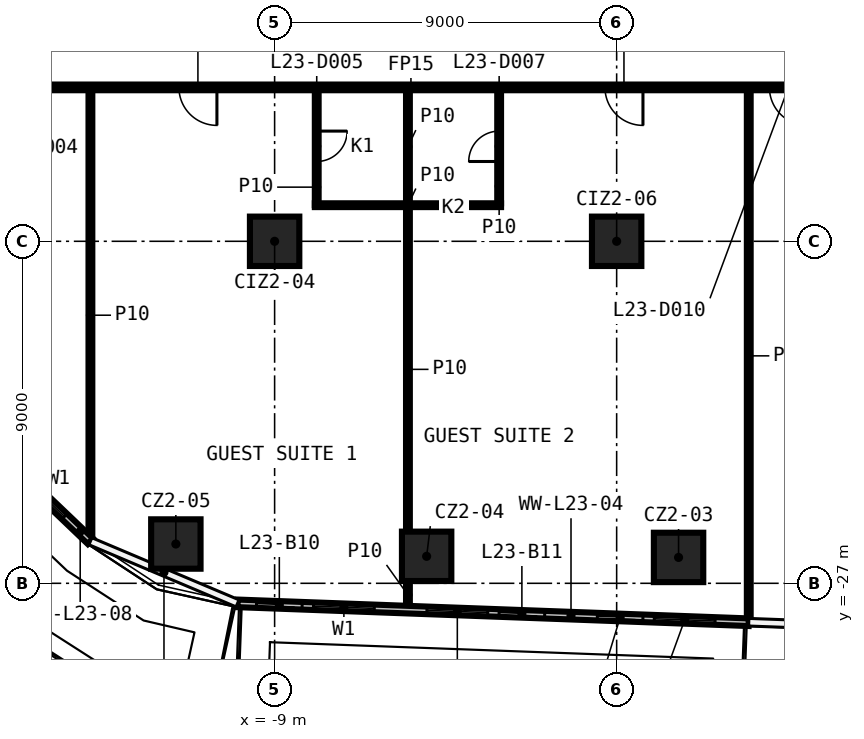
"""IFC4 building model, lengths in metres.
Left out: names, types, materials, properties, quantities, classifications, styles, units other than length and angle.
Written with IfcOpenShell. Run it as: python <this file> out.ifc"""

import sys

from ifc_helpers import new_model, si_unit, direction, frame, frame_2d, origin, origin_2d, place, context, subcontext, project, spatial, rectangle, extrude, element, fill, save


model = new_model("IFC4")
c1 = context("Model", 3, precision=1e-05, world=origin(), true_north=direction((0.0, 1.0)))
c2 = subcontext(c1, "Body", "Model", "MODEL_VIEW")
j1 = project(units=[si_unit("LENGTHUNIT", "METRE"), si_unit("PLANEANGLEUNIT", "RADIAN")], contexts=[c1])
p1 = place(None, origin())
s1 = spatial("IfcSite", under=j1, at=p1, CompositionType="ELEMENT")
p2 = place(p1, origin())
s2 = spatial("IfcBuilding", under=s1, at=p2, CompositionType="ELEMENT")
p3 = place(p2, frame((0.0, 0.0, 110.0)))
s3 = spatial("IfcBuildingStorey", under=s2, at=p3, CompositionType="ELEMENT", Elevation=110.0)
for number, where, z_axis, x_axis in (
    (1, (1.629, -26.319, 0.0), (0.0, 0.0, 1.0), (1.0, 0.0, 0.0)),
    (2, (-5.0, -26.29, 0.0), (0.0, 0.0, 1.0), (1.0, 0.0, 0.0)),
    (3, (-11.599, -25.966, 0.0), (0.0, 0.0, 1.0), (1.0, 0.0, 0.0)),
    (4, (-9.0, -18.0, 0.0), (0.0, 0.0, 1.0), (1.0, 0.0, 0.0)),
    (5, (0.0, -18.0, 0.0), (0.0, 0.0, 1.0), (1.0, 0.0, 0.0)),
):
    element("IfcColumn", number, at=place(p3, frame(where, z_axis=z_axis, x_axis=x_axis)), inside=s3, PredefinedType="COLUMN", context=c2, shape_type="SweptSolid", body=[
        extrude(rectangle(XDim=1.3, YDim=1.3, at=origin_2d()), origin(), (0.0, 0.0, 1.0), 3.3),
    ])
p4 = place(p3, frame((-7.942, -17.05, 0.0), z_axis=(0.0, 0.0, 1.0), x_axis=(1.0, 0.0, 0.0)))
e6 = element("IfcWall", 6, at=p4, inside=s3, PredefinedType="PARTITIONING", context=c2, shape_type="SweptSolid", body=[
    extrude(rectangle(XDim=4.9, YDim=0.1, at=frame_2d((2.45, 0.0))), origin(), (0.0, 0.0, 1.0), 3.3),
])
p5 = place(p3, frame((17.025, -13.95, 0.0), z_axis=(0.0, 0.0, 1.0), x_axis=(-1.0, 0.0, 0.0)))
e7 = element("IfcWall", 7, at=p5, inside=s3, PredefinedType="PARTITIONING", context=c2, shape_type="SweptSolid", body=[
    extrude(rectangle(XDim=34.05, YDim=0.15, at=frame_2d((17.025, 0.0))), origin(), (0.0, 0.0, 1.0), 3.3),
])
p6 = place(p5, frame((31.974, 0.0, 0.0)))
e8 = element("IfcOpeningElement", 8, at=p6, cuts=e7, PredefinedType="OPENING", context=c2, shape_type="SweptSolid", body=[
    extrude(rectangle(XDim=0.9, YDim=2.1, at=frame_2d((0.45, 1.05))), frame((0.0, 0.085, 0.0), z_axis=(0.0, -1.0, 0.0), x_axis=(1.0, 0.0, 0.0)), (0.0, 0.0, 1.0), 0.17),
])
p7 = place(p5, frame((27.543, 0.0, 0.0)))
e9 = element("IfcOpeningElement", 9, at=p7, cuts=e7, PredefinedType="OPENING", context=c2, shape_type="SweptSolid", body=[
    extrude(rectangle(XDim=1.0, YDim=2.1, at=frame_2d((0.5, 1.05))), frame((0.0, 0.085, 0.0), z_axis=(0.0, -1.0, 0.0), x_axis=(1.0, 0.0, 0.0)), (0.0, 0.0, 1.0), 0.17),
])
p8 = place(p5, frame((16.333, 0.0, 0.0)))
e10 = element("IfcOpeningElement", 10, at=p8, cuts=e7, PredefinedType="OPENING", context=c2, shape_type="SweptSolid", body=[
    extrude(rectangle(XDim=1.0, YDim=2.1, at=frame_2d((0.5, 1.05))), frame((0.0, 0.085, 0.0), z_axis=(0.0, -1.0, 0.0), x_axis=(1.0, 0.0, 0.0)), (0.0, 0.0, 1.0), 0.17),
])
p9 = place(p5, frame((12.006, 0.0, 0.0)))
e11 = element("IfcOpeningElement", 11, at=p9, cuts=e7, PredefinedType="OPENING", context=c2, shape_type="SweptSolid", body=[
    extrude(rectangle(XDim=1.0, YDim=2.1, at=frame_2d((0.5, 1.05))), frame((0.0, 0.085, 0.0), z_axis=(0.0, -1.0, 0.0), x_axis=(1.0, 0.0, 0.0)), (0.0, 0.0, 1.0), 0.17),
])
p10 = place(p5, frame((5.124, 0.0, 0.0)))
e12 = element("IfcOpeningElement", 12, at=p10, cuts=e7, PredefinedType="OPENING", context=c2, shape_type="SweptSolid", body=[
    extrude(rectangle(XDim=1.0, YDim=2.1, at=frame_2d((0.5, 1.05))), frame((0.0, 0.085, 0.0), z_axis=(0.0, -1.0, 0.0), x_axis=(1.0, 0.0, 0.0)), (0.0, 0.0, 1.0), 0.17),
])
p11 = place(p5, frame((3.144, 0.0, 0.0)))
e13 = element("IfcOpeningElement", 13, at=p11, cuts=e7, PredefinedType="OPENING", context=c2, shape_type="SweptSolid", body=[
    extrude(rectangle(XDim=1.0, YDim=2.1, at=frame_2d((0.5, 1.05))), frame((0.0, 0.085, 0.0), z_axis=(0.0, -1.0, 0.0), x_axis=(1.0, 0.0, 0.0)), (0.0, 0.0, 1.0), 0.17),
])
p12 = place(p3, frame((3.476, -28.004, 0.0), z_axis=(0.0, 0.0, 1.0), x_axis=(0.0, 1.0, 0.0)))
e14 = element("IfcWall", 14, at=p12, inside=s3, PredefinedType="PARTITIONING", context=c2, shape_type="SweptSolid", body=[
    extrude(rectangle(XDim=13.979, YDim=0.1, at=frame_2d((6.99, 0.0))), origin(), (0.0, 0.0, 1.0), 3.3),
])
p13 = place(p3, frame((-3.092, -17.0, 0.0), z_axis=(0.0, 0.0, 1.0), x_axis=(0.0, 1.0, 0.0)))
e15 = element("IfcWall", 15, at=p13, inside=s3, PredefinedType="PARTITIONING", context=c2, shape_type="SweptSolid", body=[
    extrude(rectangle(XDim=2.975, YDim=0.1, at=frame_2d((1.488, 0.0))), origin(), (0.0, 0.0, 1.0), 3.3),
])
p14 = place(p13, frame((1.1, 0.0, 0.0)))
e16 = element("IfcOpeningElement", 16, at=p14, cuts=e15, PredefinedType="OPENING", context=c2, shape_type="SweptSolid", body=[
    extrude(rectangle(XDim=0.8, YDim=2.1, at=frame_2d((0.4, 1.05))), frame((0.0, 0.06, 0.0), z_axis=(0.0, -1.0, 0.0), x_axis=(1.0, 0.0, 0.0)), (0.0, 0.0, 1.0), 0.12),
])
p15 = place(p3, frame((-5.492, -27.673, 0.0), z_axis=(0.0, 0.0, 1.0), x_axis=(0.0, 1.0, 0.0)))
e17 = element("IfcWall", 17, at=p15, inside=s3, PredefinedType="PARTITIONING", context=c2, shape_type="SweptSolid", body=[
    extrude(rectangle(XDim=0.733, YDim=0.1, at=frame_2d((0.367, 0.0))), origin(), (0.0, 0.0, 1.0), 3.3),
])
p16 = place(p3, frame((-5.492, -25.64, 0.0), z_axis=(0.0, 0.0, 1.0), x_axis=(0.0, 1.0, 0.0)))
e18 = element("IfcWall", 18, at=p16, inside=s3, PredefinedType="PARTITIONING", context=c2, shape_type="SweptSolid", body=[
    extrude(rectangle(XDim=8.54, YDim=0.1, at=frame_2d((4.27, 0.0))), origin(), (0.0, 0.0, 1.0), 3.3),
])
p17 = place(p3, frame((-5.492, -17.0, 0.0), z_axis=(0.0, 0.0, 1.0), x_axis=(0.0, 1.0, 0.0)))
e19 = element("IfcWall", 19, at=p17, inside=s3, PredefinedType="PARTITIONING", context=c2, shape_type="SweptSolid", body=[
    extrude(rectangle(XDim=2.975, YDim=0.1, at=frame_2d((1.488, 0.0))), origin(), (0.0, 0.0, 1.0), 3.3),
])
p18 = place(p3, frame((-7.892, -14.025, 0.0), z_axis=(0.0, 0.0, 1.0), x_axis=(0.0, -1.0, 0.0)))
e20 = element("IfcWall", 20, at=p18, inside=s3, PredefinedType="PARTITIONING", context=c2, shape_type="SweptSolid", body=[
    extrude(rectangle(XDim=3.025, YDim=0.1, at=frame_2d((1.513, 0.0))), origin(), (0.0, 0.0, 1.0), 3.3),
])
p19 = place(p18, frame((1.075, 0.0, 0.0)))
e21 = element("IfcOpeningElement", 21, at=p19, cuts=e20, PredefinedType="OPENING", context=c2, shape_type="SweptSolid", body=[
    extrude(rectangle(XDim=0.8, YDim=2.1, at=frame_2d((0.4, 1.05))), frame((0.0, 0.06, 0.0), z_axis=(0.0, -1.0, 0.0), x_axis=(1.0, 0.0, 0.0)), (0.0, 0.0, 1.0), 0.12),
])
p20 = place(p3, frame((-13.847, -25.865, 0.0), z_axis=(0.0, 0.0, 1.0), x_axis=(0.0, 1.0, 0.0)))
e22 = element("IfcWall", 22, at=p20, inside=s3, PredefinedType="PARTITIONING", context=c2, shape_type="SweptSolid", body=[
    extrude(rectangle(XDim=11.84, YDim=0.1, at=frame_2d((5.92, 0.0))), origin(), (0.0, 0.0, 1.0), 3.3),
])
p21 = place(p3, frame((-17.133, -22.756, 0.0), z_axis=(0.0, 0.0, 1.0), x_axis=(0.723361644964, -0.69046935529, 0.0)))
e23 = element("IfcWall", 23, at=p21, inside=s3, PredefinedType="SOLIDWALL", context=c2, shape_type="SweptSolid", body=[
    extrude(rectangle(XDim=4.542, YDim=0.2, at=frame_2d((2.271, 0.0))), origin(), (0.0, 0.0, 1.0), 3.3),
])
p22 = place(p21, frame((2.0, 0.0, 0.6)))
e24 = element("IfcOpeningElement", 24, at=p22, cuts=e23, PredefinedType="OPENING", context=c2, shape_type="SweptSolid", body=[
    extrude(rectangle(XDim=1.6, YDim=2.4, at=frame_2d((0.8, 1.2))), frame((0.0, 0.11, 0.0), z_axis=(0.0, -1.0, 0.0), x_axis=(1.0, 0.0, 0.0)), (0.0, 0.0, 1.0), 0.22),
])
p23 = place(p21, frame((0.5, 0.0, 0.0)))
e25 = element("IfcOpeningElement", 25, at=p23, cuts=e23, PredefinedType="OPENING", context=c2, shape_type="SweptSolid", body=[
    extrude(rectangle(XDim=1.2, YDim=2.4, at=frame_2d((0.6, 1.2))), frame((0.0, 0.11, 0.0), z_axis=(0.0, -1.0, 0.0), x_axis=(1.0, 0.0, 0.0)), (0.0, 0.0, 1.0), 0.22),
])
p24 = place(p3, frame((-9.975, -27.528, 0.0), z_axis=(0.0, 0.0, 1.0), x_axis=(0.999319917794, -0.036874135924, 0.0)))
e26 = element("IfcWall", 26, at=p24, inside=s3, PredefinedType="SOLIDWALL", context=c2, shape_type="SweptSolid", body=[
    extrude(rectangle(XDim=13.46, YDim=0.2, at=frame_2d((6.73, 0.0))), origin(), (0.0, 0.0, 1.0), 3.3),
])
p25 = place(p24, frame((2.0, 0.0, 0.6)))
e27 = element("IfcOpeningElement", 27, at=p25, cuts=e26, PredefinedType="OPENING", context=c2, shape_type="SweptSolid", body=[
    extrude(rectangle(XDim=1.6, YDim=2.4, at=frame_2d((0.8, 1.2))), frame((0.0, 0.11, 0.0), z_axis=(0.0, -1.0, 0.0), x_axis=(1.0, 0.0, 0.0)), (0.0, 0.0, 1.0), 0.22),
])
p26 = place(p24, frame((0.5, 0.0, 0.0)))
e28 = element("IfcOpeningElement", 28, at=p26, cuts=e26, PredefinedType="OPENING", context=c2, shape_type="SweptSolid", body=[
    extrude(rectangle(XDim=1.2, YDim=2.4, at=frame_2d((0.6, 1.2))), frame((0.0, 0.11, 0.0), z_axis=(0.0, -1.0, 0.0), x_axis=(1.0, 0.0, 0.0)), (0.0, 0.0, 1.0), 0.22),
])
p27 = place(p24, frame((4.987, 0.0, 0.6)))
e29 = element("IfcOpeningElement", 29, at=p27, cuts=e26, PredefinedType="OPENING", context=c2, shape_type="SweptSolid", body=[
    extrude(rectangle(XDim=1.6, YDim=2.4, at=frame_2d((0.8, 1.2))), frame((0.0, 0.11, 0.0), z_axis=(0.0, -1.0, 0.0), x_axis=(1.0, 0.0, 0.0)), (0.0, 0.0, 1.0), 0.22),
])
p28 = place(p24, frame((6.887, 0.0, 0.0)))
e30 = element("IfcOpeningElement", 30, at=p28, cuts=e26, PredefinedType="OPENING", context=c2, shape_type="SweptSolid", body=[
    extrude(rectangle(XDim=1.2, YDim=2.4, at=frame_2d((0.6, 1.2))), frame((0.0, 0.11, 0.0), z_axis=(0.0, -1.0, 0.0), x_axis=(1.0, 0.0, 0.0)), (0.0, 0.0, 1.0), 0.22),
])
p29 = place(p24, frame((10.974, 0.0, 0.6)))
e31 = element("IfcOpeningElement", 31, at=p29, cuts=e26, PredefinedType="OPENING", context=c2, shape_type="SweptSolid", body=[
    extrude(rectangle(XDim=1.6, YDim=2.4, at=frame_2d((0.8, 1.2))), frame((0.0, 0.11, 0.0), z_axis=(0.0, -1.0, 0.0), x_axis=(1.0, 0.0, 0.0)), (0.0, 0.0, 1.0), 0.22),
])
p30 = place(p24, frame((9.474, 0.0, 0.0)))
e32 = element("IfcOpeningElement", 32, at=p30, cuts=e26, PredefinedType="OPENING", context=c2, shape_type="SweptSolid", body=[
    extrude(rectangle(XDim=1.2, YDim=2.4, at=frame_2d((0.6, 1.2))), frame((0.0, 0.11, 0.0), z_axis=(0.0, -1.0, 0.0), x_axis=(1.0, 0.0, 0.0)), (0.0, 0.0, 1.0), 0.22),
])
p31 = place(p19, origin())
e33 = element("IfcDoor", 33, at=p31, inside=s3, OperationType="SINGLE_SWING_RIGHT", PredefinedType="DOOR", context=c2, shape_type="SweptSolid", body=[
    extrude(rectangle(XDim=0.8, YDim=2.1, at=frame_2d((0.4, 1.05))), frame((0.0, 0.025, 0.0), z_axis=(0.0, -1.0, 0.0), x_axis=(1.0, 0.0, 0.0)), (0.0, 0.0, 1.0), 0.05),
])
fill(e21, e33)
p32 = place(p7, origin())
e34 = element("IfcDoor", 34, at=p32, inside=s3, OperationType="SINGLE_SWING_LEFT", PredefinedType="DOOR", context=c2, shape_type="SweptSolid", body=[
    extrude(rectangle(XDim=1.0, YDim=2.1, at=frame_2d((0.5, 1.05))), frame((0.0, 0.025, 0.0), z_axis=(0.0, -1.0, 0.0), x_axis=(1.0, 0.0, 0.0)), (0.0, 0.0, 1.0), 0.05),
])
fill(e9, e34)
p33 = place(p14, origin())
e35 = element("IfcDoor", 35, at=p33, inside=s3, OperationType="SINGLE_SWING_LEFT", PredefinedType="DOOR", context=c2, shape_type="SweptSolid", body=[
    extrude(rectangle(XDim=0.8, YDim=2.1, at=frame_2d((0.4, 1.05))), frame((0.0, 0.025, 0.0), z_axis=(0.0, -1.0, 0.0), x_axis=(1.0, 0.0, 0.0)), (0.0, 0.0, 1.0), 0.05),
])
fill(e16, e35)
p34 = place(p8, origin())
e36 = element("IfcDoor", 36, at=p34, inside=s3, OperationType="SINGLE_SWING_RIGHT", PredefinedType="DOOR", context=c2, shape_type="SweptSolid", body=[
    extrude(rectangle(XDim=1.0, YDim=2.1, at=frame_2d((0.5, 1.05))), frame((0.0, 0.025, 0.0), z_axis=(0.0, -1.0, 0.0), x_axis=(1.0, 0.0, 0.0)), (0.0, 0.0, 1.0), 0.05),
])
fill(e10, e36)
p35 = place(p9, origin())
e37 = element("IfcDoor", 37, at=p35, inside=s3, OperationType="SINGLE_SWING_LEFT", PredefinedType="DOOR", context=c2, shape_type="SweptSolid", body=[
    extrude(rectangle(XDim=1.0, YDim=2.1, at=frame_2d((0.5, 1.05))), frame((0.0, 0.025, 0.0), z_axis=(0.0, -1.0, 0.0), x_axis=(1.0, 0.0, 0.0)), (0.0, 0.0, 1.0), 0.05),
])
fill(e11, e37)
p36 = place(p22, origin())
e38 = element("IfcWindow", 38, at=p36, inside=s3, PartitioningType="SINGLE_PANEL", PredefinedType="WINDOW", context=c2, shape_type="SweptSolid", body=[
    extrude(rectangle(XDim=1.6, YDim=2.4, at=frame_2d((0.8, 1.2))), frame((0.0, 0.03, 0.0), z_axis=(0.0, -1.0, 0.0), x_axis=(1.0, 0.0, 0.0)), (0.0, 0.0, 1.0), 0.06),
])
fill(e24, e38)
p37 = place(p25, origin())
e39 = element("IfcWindow", 39, at=p37, inside=s3, PartitioningType="SINGLE_PANEL", PredefinedType="WINDOW", context=c2, shape_type="SweptSolid", body=[
    extrude(rectangle(XDim=1.6, YDim=2.4, at=frame_2d((0.8, 1.2))), frame((0.0, 0.03, 0.0), z_axis=(0.0, -1.0, 0.0), x_axis=(1.0, 0.0, 0.0)), (0.0, 0.0, 1.0), 0.06),
])
fill(e27, e39)
p38 = place(p26, origin())
e40 = element("IfcDoor", 40, at=p38, inside=s3, OperationType="SLIDING_TO_LEFT", PredefinedType="DOOR", context=c2, shape_type="SweptSolid", body=[
    extrude(rectangle(XDim=1.2, YDim=2.4, at=frame_2d((0.6, 1.2))), frame((0.0, 0.025, 0.0), z_axis=(0.0, -1.0, 0.0), x_axis=(1.0, 0.0, 0.0)), (0.0, 0.0, 1.0), 0.05),
])
fill(e28, e40)
p39 = place(p27, origin())
e41 = element("IfcWindow", 41, at=p39, inside=s3, PartitioningType="SINGLE_PANEL", PredefinedType="WINDOW", context=c2, shape_type="SweptSolid", body=[
    extrude(rectangle(XDim=1.6, YDim=2.4, at=frame_2d((0.8, 1.2))), frame((0.0, 0.03, 0.0), z_axis=(0.0, -1.0, 0.0), x_axis=(1.0, 0.0, 0.0)), (0.0, 0.0, 1.0), 0.06),
])
fill(e29, e41)
p40 = place(p28, origin())
e42 = element("IfcDoor", 42, at=p40, inside=s3, OperationType="SLIDING_TO_LEFT", PredefinedType="DOOR", context=c2, shape_type="SweptSolid", body=[
    extrude(rectangle(XDim=1.2, YDim=2.4, at=frame_2d((0.6, 1.2))), frame((0.0, 0.025, 0.0), z_axis=(0.0, -1.0, 0.0), x_axis=(1.0, 0.0, 0.0)), (0.0, 0.0, 1.0), 0.05),
])
fill(e30, e42)
p41 = place(p29, origin())
e43 = element("IfcWindow", 43, at=p41, inside=s3, PartitioningType="SINGLE_PANEL", PredefinedType="WINDOW", context=c2, shape_type="SweptSolid", body=[
    extrude(rectangle(XDim=1.6, YDim=2.4, at=frame_2d((0.8, 1.2))), frame((0.0, 0.03, 0.0), z_axis=(0.0, -1.0, 0.0), x_axis=(1.0, 0.0, 0.0)), (0.0, 0.0, 1.0), 0.06),
])
fill(e31, e43)
p42 = place(p30, origin())
e44 = element("IfcDoor", 44, at=p42, inside=s3, OperationType="SLIDING_TO_LEFT", PredefinedType="DOOR", context=c2, shape_type="SweptSolid", body=[
    extrude(rectangle(XDim=1.2, YDim=2.4, at=frame_2d((0.6, 1.2))), frame((0.0, 0.025, 0.0), z_axis=(0.0, -1.0, 0.0), x_axis=(1.0, 0.0, 0.0)), (0.0, 0.0, 1.0), 0.05),
])
fill(e32, e44)
save(model, sys.argv[1])
